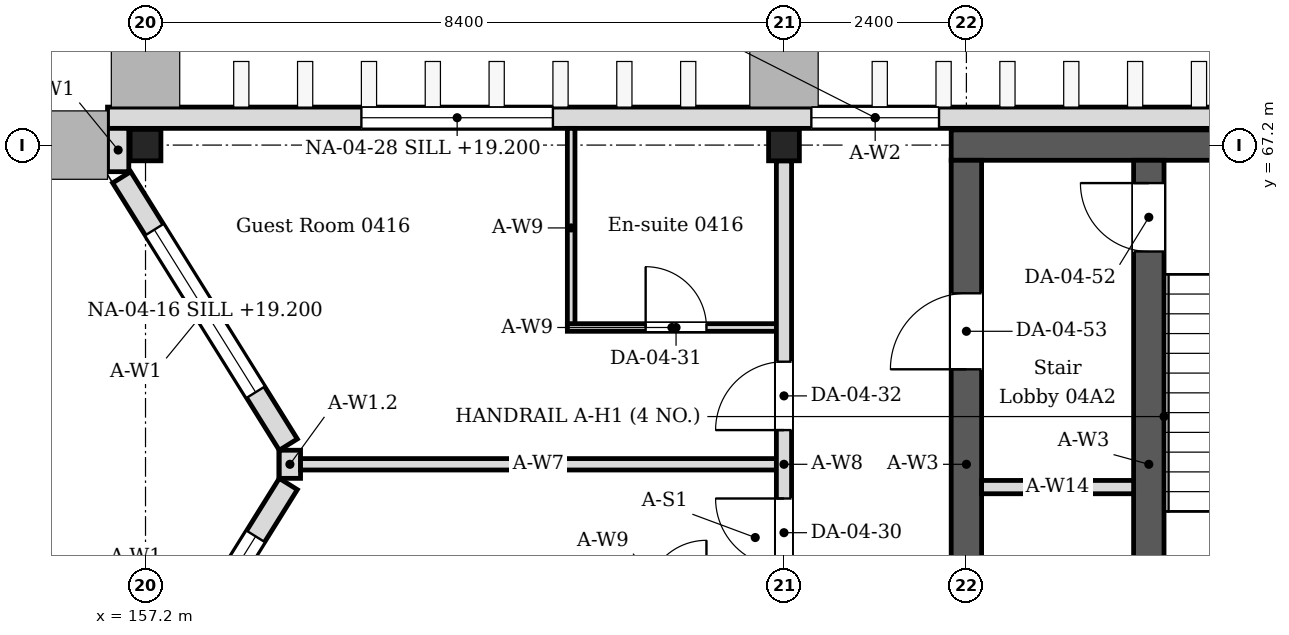
"""IFC4 building model, lengths in metres.
Left out: names, types, materials, properties, quantities, classifications, styles, units other than length and angle.
Written with IfcOpenShell. Run it as: python <this file> out.ifc"""

import sys

from ifc_helpers import new_model, si_unit, direction, frame, frame_2d, origin, origin_2d, place, context, subcontext, project, spatial, rectangle, i_section, extrude, element, fill, save


model = new_model("IFC4")
c1 = context("Model", 3, precision=1e-05, world=origin(), true_north=direction((0.0, 1.0)))
c2 = subcontext(c1, "Body", "Model", "MODEL_VIEW")
j1 = project(units=[si_unit("LENGTHUNIT", "METRE"), si_unit("PLANEANGLEUNIT", "RADIAN")], contexts=[c1])
p1 = place(None, origin())
s1 = spatial("IfcSite", under=j1, at=p1, CompositionType="ELEMENT")
p2 = place(p1, origin())
s2 = spatial("IfcBuilding", under=s1, at=p2, CompositionType="ELEMENT")
p3 = place(p2, frame((0.0, 0.0, 18.6)))
s3 = spatial("IfcBuildingStorey", under=s2, at=p3, CompositionType="ELEMENT", Elevation=18.6)
for number, where, z_axis, x_axis in (
    (1, (157.2, 67.2, 0.0), (0.0, 0.0, 1.0), (1.0, 0.0, 0.0)),
    (2, (165.6, 67.2, 0.0), (0.0, 0.0, 1.0), (1.0, 0.0, 0.0)),
):
    element("IfcColumn", number, at=place(p3, frame(where, z_axis=z_axis, x_axis=x_axis)), inside=s3, PredefinedType="COLUMN", context=c2, shape_type="SweptSolid", body=[
        extrude(i_section(OverallWidth=0.405, OverallDepth=0.414, WebThickness=0.018, FlangeThickness=0.028, FilletRadius=0.022, at=origin_2d()), origin(), (0.0, 0.0, 1.0), 4.2),
    ])
p4 = place(p3, frame((167.8, 67.2, 0.0), z_axis=(0.0, 0.0, 1.0), x_axis=(1.0, 0.0, 0.0)))
e3 = element("IfcWall", 3, at=p4, inside=s3, PredefinedType="SOLIDWALL", context=c2, shape_type="SweptSolid", body=[
    extrude(rectangle(XDim=8.8, YDim=0.4, at=frame_2d((4.4, 0.0))), origin(), (0.0, 0.0, 1.0), 4.05),
])
p5 = place(p3, frame((168.0, 59.0, 0.0), z_axis=(0.0, 0.0, 1.0), x_axis=(0.0, 1.0, 0.0)))
e4 = element("IfcWall", 4, at=p5, inside=s3, PredefinedType="SOLIDWALL", context=c2, shape_type="SweptSolid", body=[
    extrude(rectangle(XDim=8.0, YDim=0.4, at=frame_2d((4.0, 0.0))), origin(), (0.0, 0.0, 1.0), 4.05),
])
p6 = place(p5, frame((5.25, 0.0, 0.0)))
e5 = element("IfcOpeningElement", 5, at=p6, cuts=e4, PredefinedType="OPENING", context=c2, shape_type="SweptSolid", body=[
    extrude(rectangle(XDim=1.0, YDim=2.1, at=frame_2d((0.5, 1.05))), frame((0.0, 0.21, 0.0), z_axis=(0.0, -1.0, 0.0), x_axis=(1.0, 0.0, 0.0)), (0.0, 0.0, 1.0), 0.42),
])
p7 = place(p5, frame((1.275, 0.0, 0.0)))
e6 = element("IfcOpeningElement", 6, at=p7, cuts=e4, PredefinedType="OPENING", context=c2, shape_type="SweptSolid", body=[
    extrude(rectangle(XDim=1.05, YDim=2.1, at=frame_2d((0.525, 1.05))), frame((0.0, 0.21, 0.0), z_axis=(0.0, -1.0, 0.0), x_axis=(1.0, 0.0, 0.0)), (0.0, 0.0, 1.0), 0.42),
])
p8 = place(p3, frame((156.886, 59.224, 0.0), z_axis=(0.0, 0.0, 1.0), x_axis=(0.529018946142, 0.848610013271, 0.0)))
e7 = element("IfcWall", 7, at=p8, inside=s3, PredefinedType="SOLIDWALL", context=c2, shape_type="SweptSolid", body=[
    extrude(rectangle(XDim=4.144, YDim=0.28, at=frame_2d((2.072, 0.0))), origin(), (0.0, 0.0, 1.0), 4.05),
])
p9 = place(p8, frame((0.812, 0.0, 0.6)))
e8 = element("IfcOpeningElement", 8, at=p9, cuts=e7, PredefinedType="OPENING", context=c2, shape_type="SweptSolid", body=[
    extrude(rectangle(XDim=2.52, YDim=2.4, at=frame_2d((1.26, 1.2))), frame((0.0, 0.15, 0.0), z_axis=(0.0, -1.0, 0.0), x_axis=(1.0, 0.0, 0.0)), (0.0, 0.0, 1.0), 0.3),
])
p10 = place(p3, frame((159.079, 63.259, 0.0), z_axis=(0.0, 0.0, 1.0), x_axis=(-0.529018946142, 0.848610013271, 0.0)))
e9 = element("IfcWall", 9, at=p10, inside=s3, PredefinedType="SOLIDWALL", context=c2, shape_type="SweptSolid", body=[
    extrude(rectangle(XDim=4.144, YDim=0.28, at=frame_2d((2.072, 0.0))), origin(), (0.0, 0.0, 1.0), 4.05),
])
p11 = place(p10, frame((0.812, 0.0, 0.6)))
e10 = element("IfcOpeningElement", 10, at=p11, cuts=e9, PredefinedType="OPENING", context=c2, shape_type="SweptSolid", body=[
    extrude(rectangle(XDim=2.52, YDim=2.4, at=frame_2d((1.26, 1.2))), frame((0.0, 0.15, 0.0), z_axis=(0.0, -1.0, 0.0), x_axis=(1.0, 0.0, 0.0)), (0.0, 0.0, 1.0), 0.3),
])
p12 = place(p3, frame((159.1, 62.815, 0.0), z_axis=(0.0, 0.0, 1.0), x_axis=(0.0, 1.0, 0.0)))
e11 = element("IfcWall", 11, at=p12, inside=s3, PredefinedType="SOLIDWALL", context=c2, shape_type="SweptSolid", body=[
    extrude(rectangle(XDim=0.37, YDim=0.28, at=frame_2d((0.185, 0.0))), origin(), (0.0, 0.0, 1.0), 3.604),
])
p13 = place(p3, frame((156.84, 66.85, 0.0), z_axis=(0.0, 0.0, 1.0), x_axis=(0.0, 1.0, 0.0)))
e12 = element("IfcWall", 12, at=p13, inside=s3, PredefinedType="SOLIDWALL", context=c2, shape_type="SweptSolid", body=[
    extrude(rectangle(XDim=0.57, YDim=0.28, at=frame_2d((0.285, 0.0))), origin(), (0.0, 0.0, 1.0), 4.05),
])
p14 = place(p3, frame((156.7, 67.56, 0.0), z_axis=(0.0, 0.0, 1.0), x_axis=(1.0, 0.0, 0.0)))
e13 = element("IfcWall", 13, at=p14, inside=s3, PredefinedType="SOLIDWALL", context=c2, shape_type="SweptSolid", body=[
    extrude(rectangle(XDim=20.2, YDim=0.28, at=frame_2d((10.1, 0.0))), origin(), (0.0, 0.0, 1.0), 4.05),
])
p15 = place(p14, frame((9.26, 0.0, 0.6)))
e14 = element("IfcOpeningElement", 14, at=p15, cuts=e13, PredefinedType="OPENING", context=c2, shape_type="SweptSolid", body=[
    extrude(rectangle(XDim=1.68, YDim=2.4, at=frame_2d((0.84, 1.2))), frame((0.0, 0.15, 0.0), z_axis=(0.0, -1.0, 0.0), x_axis=(1.0, 0.0, 0.0)), (0.0, 0.0, 1.0), 0.3),
])
p16 = place(p14, frame((3.34, 0.0, 0.6)))
e15 = element("IfcOpeningElement", 15, at=p16, cuts=e13, PredefinedType="OPENING", context=c2, shape_type="SweptSolid", body=[
    extrude(rectangle(XDim=2.52, YDim=2.4, at=frame_2d((1.26, 1.2))), frame((0.0, 0.15, 0.0), z_axis=(0.0, -1.0, 0.0), x_axis=(1.0, 0.0, 0.0)), (0.0, 0.0, 1.0), 0.3),
])
p17 = place(p3, frame((162.8, 64.8, 0.0), z_axis=(0.0, 0.0, 1.0), x_axis=(0.0, 1.0, 0.0)))
e16 = element("IfcWall", 16, at=p17, inside=s3, PredefinedType="PARTITIONING", context=c2, shape_type="SweptSolid", body=[
    extrude(rectangle(XDim=2.62, YDim=0.1, at=frame_2d((1.31, 0.0))), origin(), (0.0, 0.0, 1.0), 4.05),
])
p18 = place(p3, frame((162.75, 64.8, 0.0), z_axis=(0.0, 0.0, 1.0), x_axis=(1.0, 0.0, 0.0)))
e17 = element("IfcWall", 17, at=p18, inside=s3, PredefinedType="PARTITIONING", context=c2, shape_type="SweptSolid", body=[
    extrude(rectangle(XDim=2.75, YDim=0.1, at=frame_2d((1.375, 0.0))), origin(), (0.0, 0.0, 1.0), 4.05),
])
p19 = place(p18, frame((1.03, 0.0, 0.0)))
e18 = element("IfcOpeningElement", 18, at=p19, cuts=e17, PredefinedType="OPENING", context=c2, shape_type="SweptSolid", body=[
    extrude(rectangle(XDim=0.8, YDim=2.1, at=frame_2d((0.4, 1.05))), frame((0.0, 0.06, 0.0), z_axis=(0.0, -1.0, 0.0), x_axis=(1.0, 0.0, 0.0)), (0.0, 0.0, 1.0), 0.12),
])
p20 = place(p3, frame((159.24, 63.0, 0.0), z_axis=(0.0, 0.0, 1.0), x_axis=(1.0, 0.0, 0.0)))
e19 = element("IfcWall", 19, at=p20, inside=s3, PredefinedType="PARTITIONING", context=c2, shape_type="SweptSolid", body=[
    extrude(rectangle(XDim=6.26, YDim=0.15, at=frame_2d((3.13, 0.0))), origin(), (0.0, 0.0, 1.0), 3.604),
])
p21 = place(p3, frame((165.6, 59.007, 0.0), z_axis=(0.0, 0.0, 1.0), x_axis=(0.0, 1.0, 0.0)))
e20 = element("IfcWall", 20, at=p21, inside=s3, PredefinedType="PARTITIONING", context=c2, shape_type="SweptSolid", body=[
    extrude(rectangle(XDim=7.986, YDim=0.2, at=frame_2d((3.993, 0.0))), origin(), (0.0, 0.0, 1.0), 3.45),
])
p22 = place(p21, frame((2.643, 0.0, 0.0)))
e21 = element("IfcOpeningElement", 21, at=p22, cuts=e20, PredefinedType="OPENING", context=c2, shape_type="SweptSolid", body=[
    extrude(rectangle(XDim=0.9, YDim=2.1, at=frame_2d((0.45, 1.05))), frame((0.0, 0.11, 0.0), z_axis=(0.0, -1.0, 0.0), x_axis=(1.0, 0.0, 0.0)), (0.0, 0.0, 1.0), 0.22),
])
p23 = place(p21, frame((4.443, 0.0, 0.0)))
e22 = element("IfcOpeningElement", 22, at=p23, cuts=e20, PredefinedType="OPENING", context=c2, shape_type="SweptSolid", body=[
    extrude(rectangle(XDim=0.9, YDim=2.1, at=frame_2d((0.45, 1.05))), frame((0.0, 0.11, 0.0), z_axis=(0.0, -1.0, 0.0), x_axis=(1.0, 0.0, 0.0)), (0.0, 0.0, 1.0), 0.22),
])
p24 = place(p3, frame((170.4, 59.0, 0.0), z_axis=(0.0, 0.0, 1.0), x_axis=(0.0, 1.0, 0.0)))
e23 = element("IfcWall", 23, at=p24, inside=s3, PredefinedType="SOLIDWALL", context=c2, shape_type="SweptSolid", body=[
    extrude(rectangle(XDim=8.0, YDim=0.4, at=frame_2d((4.0, 0.0))), origin(), (0.0, 0.0, 1.0), 4.05),
])
p25 = place(p24, frame((6.8, 0.0, 0.0)))
e24 = element("IfcOpeningElement", 24, at=p25, cuts=e23, PredefinedType="OPENING", context=c2, shape_type="SweptSolid", body=[
    extrude(rectangle(XDim=0.9, YDim=2.1, at=frame_2d((0.45, 1.05))), frame((0.0, 0.21, 0.0), z_axis=(0.0, -1.0, 0.0), x_axis=(1.0, 0.0, 0.0)), (0.0, 0.0, 1.0), 0.42),
])
p26 = place(p3, frame((168.2, 62.7, 0.0), z_axis=(0.0, 0.0, 1.0), x_axis=(1.0, 0.0, 0.0)))
e25 = element("IfcWall", 25, at=p26, inside=s3, PredefinedType="PARTITIONING", context=c2, shape_type="SweptSolid", body=[
    extrude(rectangle(XDim=2.0, YDim=0.175, at=frame_2d((1.0, 0.0))), origin(), (0.0, 0.0, 1.0), 4.05),
])
p27 = place(p9, origin())
e26 = element("IfcWindow", 26, at=p27, inside=s3, PartitioningType="SINGLE_PANEL", PredefinedType="WINDOW", context=c2, shape_type="SweptSolid", body=[
    extrude(rectangle(XDim=2.52, YDim=2.4, at=frame_2d((1.26, 1.2))), frame((0.0, 0.03, 0.0), z_axis=(0.0, -1.0, 0.0), x_axis=(1.0, 0.0, 0.0)), (0.0, 0.0, 1.0), 0.06),
])
fill(e8, e26)
p28 = place(p11, origin())
e27 = element("IfcWindow", 27, at=p28, inside=s3, PartitioningType="SINGLE_PANEL", PredefinedType="WINDOW", context=c2, shape_type="SweptSolid", body=[
    extrude(rectangle(XDim=2.52, YDim=2.4, at=frame_2d((1.26, 1.2))), frame((0.0, 0.03, 0.0), z_axis=(0.0, -1.0, 0.0), x_axis=(1.0, 0.0, 0.0)), (0.0, 0.0, 1.0), 0.06),
])
fill(e10, e27)
p29 = place(p15, origin())
e28 = element("IfcWindow", 28, at=p29, inside=s3, PartitioningType="SINGLE_PANEL", PredefinedType="WINDOW", context=c2, shape_type="SweptSolid", body=[
    extrude(rectangle(XDim=1.68, YDim=2.4, at=frame_2d((0.84, 1.2))), frame((0.0, 0.03, 0.0), z_axis=(0.0, -1.0, 0.0), x_axis=(1.0, 0.0, 0.0)), (0.0, 0.0, 1.0), 0.06),
])
fill(e14, e28)
p30 = place(p16, origin())
e29 = element("IfcWindow", 29, at=p30, inside=s3, PartitioningType="SINGLE_PANEL", PredefinedType="WINDOW", context=c2, shape_type="SweptSolid", body=[
    extrude(rectangle(XDim=2.52, YDim=2.4, at=frame_2d((1.26, 1.2))), frame((0.0, 0.03, 0.0), z_axis=(0.0, -1.0, 0.0), x_axis=(1.0, 0.0, 0.0)), (0.0, 0.0, 1.0), 0.06),
])
fill(e15, e29)
p31 = place(p22, origin())
e30 = element("IfcDoor", 30, at=p31, inside=s3, OperationType="SINGLE_SWING_RIGHT", PredefinedType="DOOR", context=c2, shape_type="SweptSolid", body=[
    extrude(rectangle(XDim=0.9, YDim=2.1, at=frame_2d((0.45, 1.05))), frame((0.0, 0.025, 0.0), z_axis=(0.0, -1.0, 0.0), x_axis=(1.0, 0.0, 0.0)), (0.0, 0.0, 1.0), 0.05),
])
fill(e21, e30)
p32 = place(p19, origin())
e31 = element("IfcDoor", 31, at=p32, inside=s3, OperationType="SINGLE_SWING_LEFT", PredefinedType="DOOR", context=c2, shape_type="SweptSolid", body=[
    extrude(rectangle(XDim=0.8, YDim=2.1, at=frame_2d((0.4, 1.05))), frame((0.0, 0.025, 0.0), z_axis=(0.0, -1.0, 0.0), x_axis=(1.0, 0.0, 0.0)), (0.0, 0.0, 1.0), 0.05),
])
fill(e18, e31)
p33 = place(p23, origin())
e32 = element("IfcDoor", 32, at=p33, inside=s3, OperationType="SINGLE_SWING_LEFT", PredefinedType="DOOR", context=c2, shape_type="SweptSolid", body=[
    extrude(rectangle(XDim=0.9, YDim=2.1, at=frame_2d((0.45, 1.05))), frame((0.0, 0.025, 0.0), z_axis=(0.0, -1.0, 0.0), x_axis=(1.0, 0.0, 0.0)), (0.0, 0.0, 1.0), 0.05),
])
fill(e22, e32)
p34 = place(p25, origin())
e33 = element("IfcDoor", 33, at=p34, inside=s3, OperationType="SINGLE_SWING_RIGHT", PredefinedType="DOOR", context=c2, shape_type="SweptSolid", body=[
    extrude(rectangle(XDim=0.9, YDim=2.1, at=frame_2d((0.45, 1.05))), frame((0.0, 0.025, 0.0), z_axis=(0.0, -1.0, 0.0), x_axis=(1.0, 0.0, 0.0)), (0.0, 0.0, 1.0), 0.05),
])
fill(e24, e33)
p35 = place(p6, origin())
e34 = element("IfcDoor", 34, at=p35, inside=s3, OperationType="SINGLE_SWING_LEFT", PredefinedType="DOOR", context=c2, shape_type="SweptSolid", body=[
    extrude(rectangle(XDim=1.0, YDim=2.1, at=frame_2d((0.5, 1.05))), frame((0.0, 0.025, 0.0), z_axis=(0.0, -1.0, 0.0), x_axis=(1.0, 0.0, 0.0)), (0.0, 0.0, 1.0), 0.05),
])
fill(e5, e34)
save(model, sys.argv[1])
